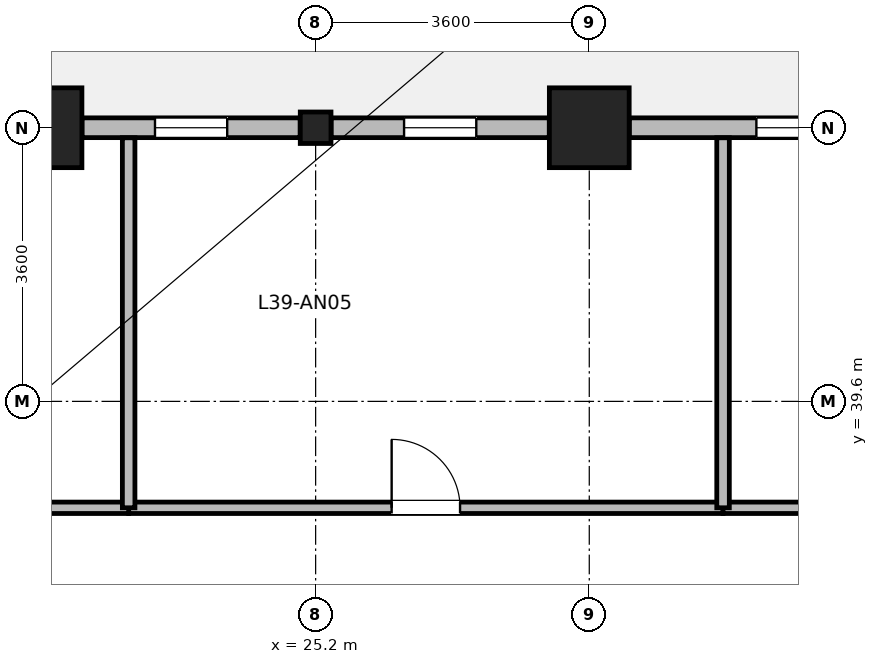
"""IFC4 building model, lengths in metres.
Left out: names, types, materials, properties, quantities, classifications, styles, units other than length and angle.
Written with IfcOpenShell. Run it as: python <this file> out.ifc"""

import sys

from ifc_helpers import new_model, si_unit, direction, frame, frame_2d, origin, origin_2d, place, context, subcontext, project, spatial, rectangle, i_section, extrude, source, transform, mapped, element, fill, save


model = new_model("IFC4")
c1 = context("Model", 3, precision=1e-05, world=origin(), true_north=direction((0.0, 1.0)))
c2 = subcontext(c1, "Body", "Model", "MODEL_VIEW")
j1 = project(units=[si_unit("LENGTHUNIT", "METRE"), si_unit("PLANEANGLEUNIT", "RADIAN")], contexts=[c1])
p1 = place(None, origin())
s1 = spatial("IfcSite", under=j1, at=p1, CompositionType="ELEMENT")
p2 = place(p1, origin())
s2 = spatial("IfcBuilding", under=s1, at=p2, CompositionType="ELEMENT")
p3 = place(p2, frame((0.0, 0.0, 155.0)))
s3 = spatial("IfcBuildingStorey", under=s2, at=p3, CompositionType="ELEMENT", Elevation=155.0)
m1 = source(origin(), c2, "Body", "SweptSolid", [
    extrude(rectangle(XDim=1.05, YDim=1.05, at=origin_2d()), origin(), (0.0, 0.0, 1.0), 3.7),
])
for number, where, z_axis, x_axis in (
    (1, (21.6, 43.2, 0.0), (0.0, 0.0, 1.0), (1.0, 0.0, 0.0)),
    (2, (28.8, 43.2, 0.0), (0.0, 0.0, 1.0), (1.0, 0.0, 0.0)),
):
    element("IfcColumn", number, at=place(p3, frame(where, z_axis=z_axis, x_axis=x_axis)), inside=s3, PredefinedType="COLUMN", context=c2, shape_type="MappedRepresentation", body=[
        mapped(m1, transform((0.0, 0.0, 0.0), x_axis=(1.0, 0.0, 0.0), y_axis=(0.0, 1.0, 0.0), z_axis=(0.0, 0.0, 1.0), scale=1.0)),
    ])
m2 = source(origin(), c2, "Body", "SweptSolid", [
    extrude(i_section(OverallWidth=0.404, OverallDepth=0.414, WebThickness=0.021, FlangeThickness=0.028, FilletRadius=0.015, at=origin_2d()), origin(), (0.0, 0.0, 1.0), 3.7),
])
p4 = place(p3, frame((25.2, 43.2, 0.0), z_axis=(0.0, 0.0, 1.0), x_axis=(1.0, 0.0, 0.0)))
e3 = element("IfcColumn", 3, at=p4, inside=s3, PredefinedType="COLUMN", context=c2, shape_type="MappedRepresentation", body=[
    mapped(m2, transform((0.0, 0.0, 0.0), x_axis=(1.0, 0.0, 0.0), y_axis=(0.0, 1.0, 0.0), z_axis=(0.0, 0.0, 1.0), scale=1.0)),
])
p5 = place(p3, frame((29.326, 43.2, 0.0), z_axis=(0.0, 0.0, 1.0), x_axis=(1.0, 0.0, 0.0)))
e4 = element("IfcWall", 4, at=p5, inside=s3, PredefinedType="STANDARD", context=c2, shape_type="SweptSolid", body=[
    extrude(rectangle(XDim=2.871, YDim=0.26, at=frame_2d((1.436, 0.0))), origin(), (0.0, 0.0, 1.0), 2.99),
])
p6 = place(p5, frame((1.673, 0.0, 0.85)))
e5 = element("IfcOpeningElement", 5, at=p6, cuts=e4, PredefinedType="OPENING", context=c2, shape_type="SweptSolid", body=[
    extrude(rectangle(XDim=0.95, YDim=1.75, at=frame_2d((0.475, 0.875))), frame((0.0, 0.14, 0.0), z_axis=(0.0, -1.0, 0.0), x_axis=(1.0, 0.0, 0.0)), (0.0, 0.0, 1.0), 0.28),
])
p7 = place(p3, frame((25.403, 43.2, 0.0), z_axis=(0.0, 0.0, 1.0), x_axis=(1.0, 0.0, 0.0)))
e6 = element("IfcWall", 6, at=p7, inside=s3, PredefinedType="STANDARD", context=c2, shape_type="SweptSolid", body=[
    extrude(rectangle(XDim=2.871, YDim=0.26, at=frame_2d((1.436, 0.0))), origin(), (0.0, 0.0, 1.0), 2.99),
])
p8 = place(p7, frame((0.96, 0.0, 0.85)))
e7 = element("IfcOpeningElement", 7, at=p8, cuts=e6, PredefinedType="OPENING", context=c2, shape_type="SweptSolid", body=[
    extrude(rectangle(XDim=0.95, YDim=1.75, at=frame_2d((0.475, 0.875))), frame((0.0, 0.14, 0.0), z_axis=(0.0, -1.0, 0.0), x_axis=(1.0, 0.0, 0.0)), (0.0, 0.0, 1.0), 0.28),
])
p9 = place(p3, frame((22.126, 43.2, 0.0), z_axis=(0.0, 0.0, 1.0), x_axis=(1.0, 0.0, 0.0)))
e8 = element("IfcWall", 8, at=p9, inside=s3, PredefinedType="STANDARD", context=c2, shape_type="SweptSolid", body=[
    extrude(rectangle(XDim=2.871, YDim=0.26, at=frame_2d((1.436, 0.0))), origin(), (0.0, 0.0, 1.0), 2.99),
])
p10 = place(p9, frame((0.96, 0.0, 0.85)))
e9 = element("IfcOpeningElement", 9, at=p10, cuts=e8, PredefinedType="OPENING", context=c2, shape_type="SweptSolid", body=[
    extrude(rectangle(XDim=0.95, YDim=1.75, at=frame_2d((0.475, 0.875))), frame((0.0, 0.14, 0.0), z_axis=(0.0, -1.0, 0.0), x_axis=(1.0, 0.0, 0.0)), (0.0, 0.0, 1.0), 0.28),
])
p11 = place(p3, frame((22.74, 38.2, 0.0), z_axis=(0.0, 0.0, 1.0), x_axis=(1.0, 0.0, 0.0)))
e10 = element("IfcWall", 10, at=p11, inside=s3, PredefinedType="PARTITIONING", context=c2, shape_type="SweptSolid", body=[
    extrude(rectangle(XDim=7.82, YDim=0.15, at=frame_2d((3.91, 0.0))), origin(), (0.0, 0.0, 1.0), 3.44),
])
p12 = place(p11, frame((3.46, 0.0, 0.0)))
e11 = element("IfcOpeningElement", 11, at=p12, cuts=e10, PredefinedType="OPENING", context=c2, shape_type="SweptSolid", body=[
    extrude(rectangle(XDim=0.9, YDim=2.08, at=frame_2d((0.45, 1.04))), frame((0.0, 0.085, 0.0), z_axis=(0.0, -1.0, 0.0), x_axis=(1.0, 0.0, 0.0)), (0.0, 0.0, 1.0), 0.17),
])
p13 = place(p3, frame((15.92, 38.2, 0.0), z_axis=(0.0, 0.0, 1.0), x_axis=(1.0, 0.0, 0.0)))
e12 = element("IfcWall", 12, at=p13, inside=s3, PredefinedType="PARTITIONING", context=c2, shape_type="SweptSolid", body=[
    extrude(rectangle(XDim=6.82, YDim=0.15, at=frame_2d((3.41, 0.0))), origin(), (0.0, 0.0, 1.0), 3.44),
])
p14 = place(p13, frame((2.76, 0.0, 0.0)))
e13 = element("IfcOpeningElement", 13, at=p14, cuts=e12, PredefinedType="OPENING", context=c2, shape_type="SweptSolid", body=[
    extrude(rectangle(XDim=1.3, YDim=2.12, at=frame_2d((0.65, 1.06))), frame((0.0, 0.085, 0.0), z_axis=(0.0, -1.0, 0.0), x_axis=(1.0, 0.0, 0.0)), (0.0, 0.0, 1.0), 0.17),
])
p15 = place(p3, frame((30.56, 38.2, 0.0), z_axis=(0.0, 0.0, 1.0), x_axis=(1.0, 0.0, 0.0)))
e14 = element("IfcWall", 14, at=p15, inside=s3, PredefinedType="PARTITIONING", context=c2, shape_type="SweptSolid", body=[
    extrude(rectangle(XDim=4.8, YDim=0.15, at=frame_2d((2.4, 0.0))), origin(), (0.0, 0.0, 1.0), 3.44),
])
p16 = place(p15, frame((1.75, 0.0, 0.0)))
e15 = element("IfcOpeningElement", 15, at=p16, cuts=e14, PredefinedType="OPENING", context=c2, shape_type="SweptSolid", body=[
    extrude(rectangle(XDim=1.3, YDim=2.12, at=frame_2d((0.65, 1.06))), frame((0.0, 0.085, 0.0), z_axis=(0.0, -1.0, 0.0), x_axis=(1.0, 0.0, 0.0)), (0.0, 0.0, 1.0), 0.17),
])
for number, where, z_axis, x_axis in (
    (16, (22.74, 38.2, 0.0), (0.0, 0.0, 1.0), (0.0, 1.0, 0.0)),
    (17, (30.56, 38.2, 0.0), (0.0, 0.0, 1.0), (0.0, 1.0, 0.0)),
):
    element("IfcWall", number, at=place(p3, frame(where, z_axis=z_axis, x_axis=x_axis)), inside=s3, PredefinedType="PARTITIONING", context=c2, shape_type="SweptSolid", body=[
        extrude(rectangle(XDim=4.868, YDim=0.165, at=frame_2d((2.434, 0.0))), origin(), (0.0, 0.0, 1.0), 3.44),
    ])
p17 = place(p6, origin())
e18 = element("IfcWindow", 18, at=p17, inside=s3, PartitioningType="SINGLE_PANEL", PredefinedType="WINDOW", context=c2, shape_type="SweptSolid", body=[
    extrude(rectangle(XDim=0.95, YDim=1.75, at=frame_2d((0.475, 0.875))), frame((0.0, 0.03, 0.0), z_axis=(0.0, -1.0, 0.0), x_axis=(1.0, 0.0, 0.0)), (0.0, 0.0, 1.0), 0.06),
])
fill(e5, e18)
p18 = place(p8, origin())
e19 = element("IfcWindow", 19, at=p18, inside=s3, PartitioningType="SINGLE_PANEL", PredefinedType="WINDOW", context=c2, shape_type="SweptSolid", body=[
    extrude(rectangle(XDim=0.95, YDim=1.75, at=frame_2d((0.475, 0.875))), frame((0.0, 0.03, 0.0), z_axis=(0.0, -1.0, 0.0), x_axis=(1.0, 0.0, 0.0)), (0.0, 0.0, 1.0), 0.06),
])
fill(e7, e19)
p19 = place(p10, origin())
e20 = element("IfcWindow", 20, at=p19, inside=s3, PartitioningType="SINGLE_PANEL", PredefinedType="WINDOW", context=c2, shape_type="SweptSolid", body=[
    extrude(rectangle(XDim=0.95, YDim=1.75, at=frame_2d((0.475, 0.875))), frame((0.0, 0.03, 0.0), z_axis=(0.0, -1.0, 0.0), x_axis=(1.0, 0.0, 0.0)), (0.0, 0.0, 1.0), 0.06),
])
fill(e9, e20)
p20 = place(p12, origin())
e21 = element("IfcDoor", 21, at=p20, inside=s3, OperationType="SINGLE_SWING_LEFT", PredefinedType="DOOR", context=c2, shape_type="SweptSolid", body=[
    extrude(rectangle(XDim=0.9, YDim=2.08, at=frame_2d((0.45, 1.04))), frame((0.0, 0.025, 0.0), z_axis=(0.0, -1.0, 0.0), x_axis=(1.0, 0.0, 0.0)), (0.0, 0.0, 1.0), 0.05),
])
fill(e11, e21)
save(model, sys.argv[1])
